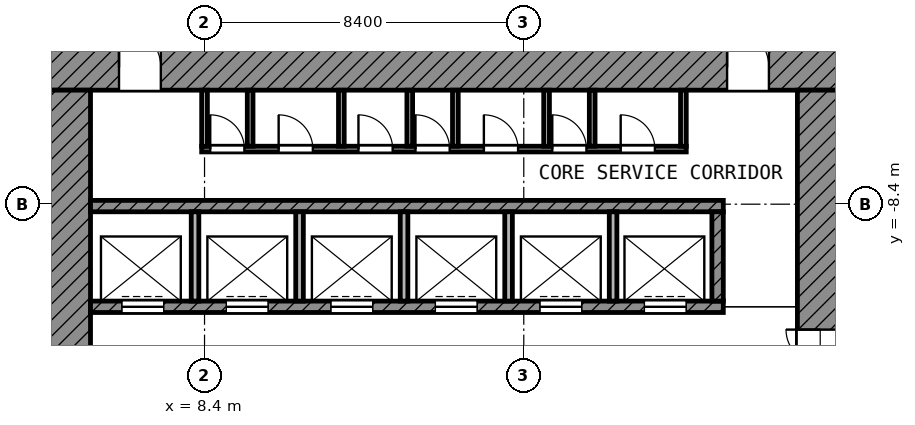
"""IFC4 building model, lengths in metres.
Left out: names, types, materials, properties, quantities, classifications, styles, units other than length and angle.
Written with IfcOpenShell. Run it as: python <this file> out.ifc"""

import sys

from ifc_helpers import new_model, si_unit, direction, frame, frame_2d, origin, place, context, subcontext, project, spatial, rectangle, extrude, element, fill, save


model = new_model("IFC4")
c1 = context("Model", 3, precision=1e-05, world=origin(), true_north=direction((0.0, 1.0)))
c2 = subcontext(c1, "Body", "Model", "MODEL_VIEW")
j1 = project(units=[si_unit("LENGTHUNIT", "METRE"), si_unit("PLANEANGLEUNIT", "RADIAN")], contexts=[c1])
p1 = place(None, origin())
s1 = spatial("IfcSite", under=j1, at=p1, CompositionType="ELEMENT")
p2 = place(p1, origin())
s2 = spatial("IfcBuilding", under=s1, at=p2, CompositionType="ELEMENT")
p3 = place(p2, origin())
s3 = spatial("IfcBuildingStorey", under=s2, at=p3, CompositionType="ELEMENT", Elevation=0.0)
p4 = place(p3, frame((5.381, -0.831, 0.0), z_axis=(0.0, 0.0, 1.0), x_axis=(-0.707106781187, -0.707106781187, 0.0)))
e1 = element("IfcWall", 1, at=p4, inside=s3, PredefinedType="SOLIDWALL", context=c2, shape_type="SweptSolid", body=[
    extrude(rectangle(XDim=6.435, YDim=0.3, at=frame_2d((3.217, 0.0))), origin(), (0.0, 0.0, 1.0), 5.25),
])
p5 = place(p4, frame((0.409, 0.0, 1.0)))
e2 = element("IfcOpeningElement", 2, at=p5, cuts=e1, PredefinedType="OPENING", context=c2, shape_type="SweptSolid", body=[
    extrude(rectangle(XDim=2.4, YDim=1.8, at=frame_2d((1.2, 0.9))), frame((0.0, 0.16, 0.0), z_axis=(0.0, -1.0, 0.0), x_axis=(1.0, 0.0, 0.0)), (0.0, 0.0, 1.0), 0.32),
])
p6 = place(p4, frame((3.626, 0.0, 1.0)))
e3 = element("IfcOpeningElement", 3, at=p6, cuts=e1, PredefinedType="OPENING", context=c2, shape_type="SweptSolid", body=[
    extrude(rectangle(XDim=2.4, YDim=1.8, at=frame_2d((1.2, 0.9))), frame((0.0, 0.16, 0.0), z_axis=(0.0, -1.0, 0.0), x_axis=(1.0, 0.0, 0.0)), (0.0, 0.0, 1.0), 0.32),
])
p7 = place(p3, frame((4.2, -4.8, 0.0), z_axis=(0.0, 0.0, 1.0), x_axis=(1.0, 0.0, 0.0)))
e4 = element("IfcWall", 4, at=p7, inside=s3, PredefinedType="SHEAR", context=c2, shape_type="SweptSolid", body=[
    extrude(rectangle(XDim=21.0, YDim=1.2, at=frame_2d((10.5, 0.0))), origin(), (0.0, 0.0, 1.0), 6.65),
])
p8 = place(p7, frame((1.95, 0.0, 0.0)))
e5 = element("IfcOpeningElement", 5, at=p8, cuts=e4, PredefinedType="OPENING", context=c2, shape_type="SweptSolid", body=[
    extrude(rectangle(XDim=1.1, YDim=2.1, at=frame_2d((0.55, 1.05))), frame((0.0, 0.61, 0.0), z_axis=(0.0, -1.0, 0.0), x_axis=(1.0, 0.0, 0.0)), (0.0, 0.0, 1.0), 1.22),
])
p9 = place(p7, frame((17.95, 0.0, 0.0)))
e6 = element("IfcOpeningElement", 6, at=p9, cuts=e4, PredefinedType="OPENING", context=c2, shape_type="SweptSolid", body=[
    extrude(rectangle(XDim=1.1, YDim=2.1, at=frame_2d((0.55, 1.05))), frame((0.0, 0.61, 0.0), z_axis=(0.0, -1.0, 0.0), x_axis=(1.0, 0.0, 0.0)), (0.0, 0.0, 1.0), 1.22),
])
p10 = place(p3, frame((4.8, -25.2, 0.0), z_axis=(0.0, 0.0, 1.0), x_axis=(0.0, 1.0, 0.0)))
e7 = element("IfcWall", 7, at=p10, inside=s3, PredefinedType="SHEAR", context=c2, shape_type="SweptSolid", body=[
    extrude(rectangle(XDim=19.8, YDim=1.2, at=frame_2d((9.9, 0.0))), origin(), (0.0, 0.0, 1.0), 6.65),
])
p11 = place(p10, frame((11.65, 0.0, 0.0)))
e8 = element("IfcOpeningElement", 8, at=p11, cuts=e7, PredefinedType="OPENING", context=c2, shape_type="SweptSolid", body=[
    extrude(rectangle(XDim=1.1, YDim=2.1, at=frame_2d((0.55, 1.05))), frame((0.0, 0.61, 0.0), z_axis=(0.0, -1.0, 0.0), x_axis=(1.0, 0.0, 0.0)), (0.0, 0.0, 1.0), 1.22),
])
p12 = place(p10, frame((2.35, 0.0, 0.0)))
e9 = element("IfcOpeningElement", 9, at=p12, cuts=e7, PredefinedType="OPENING", context=c2, shape_type="SweptSolid", body=[
    extrude(rectangle(XDim=1.1, YDim=2.1, at=frame_2d((0.55, 1.05))), frame((0.0, 0.61, 0.0), z_axis=(0.0, -1.0, 0.0), x_axis=(1.0, 0.0, 0.0)), (0.0, 0.0, 1.0), 1.22),
])
p13 = place(p3, frame((24.6, -24.0, 0.0), z_axis=(0.0, 0.0, 1.0), x_axis=(0.0, 1.0, 0.0)))
e10 = element("IfcWall", 10, at=p13, inside=s3, PredefinedType="SHEAR", context=c2, shape_type="SweptSolid", body=[
    extrude(rectangle(XDim=18.6, YDim=1.2, at=frame_2d((9.3, 0.0))), origin(), (0.0, 0.0, 1.0), 6.65),
])
p14 = place(p13, frame((10.5, 0.0, 0.0)))
e11 = element("IfcOpeningElement", 11, at=p14, cuts=e10, PredefinedType="OPENING", context=c2, shape_type="SweptSolid", body=[
    extrude(rectangle(XDim=1.8, YDim=2.1, at=frame_2d((0.9, 1.05))), frame((0.0, 0.61, 0.0), z_axis=(0.0, -1.0, 0.0), x_axis=(1.0, 0.0, 0.0)), (0.0, 0.0, 1.0), 1.22),
])
p15 = place(p3, frame((5.4, -8.45, 0.0), z_axis=(0.0, 0.0, 1.0), x_axis=(1.0, 0.0, 0.0)))
e12 = element("IfcWall", 12, at=p15, inside=s3, PredefinedType="SHEAR", context=c2, shape_type="SweptSolid", body=[
    extrude(rectangle(XDim=16.65, YDim=0.3, at=frame_2d((8.325, 0.0))), origin(), (0.0, 0.0, 1.0), 6.65),
])
p16 = place(p3, frame((5.4, -11.1, 0.0), z_axis=(0.0, 0.0, 1.0), x_axis=(1.0, 0.0, 0.0)))
e13 = element("IfcWall", 13, at=p16, inside=s3, PredefinedType="SHEAR", context=c2, shape_type="SweptSolid", body=[
    extrude(rectangle(XDim=16.65, YDim=0.3, at=frame_2d((8.325, 0.0))), origin(), (0.0, 0.0, 1.0), 6.65),
])
p17 = place(p16, frame((0.825, 0.0, 0.0)))
e14 = element("IfcOpeningElement", 14, at=p17, cuts=e13, PredefinedType="OPENING", context=c2, shape_type="SweptSolid", body=[
    extrude(rectangle(XDim=1.1, YDim=2.1, at=frame_2d((0.55, 1.05))), frame((0.0, 0.16, 0.0), z_axis=(0.0, -1.0, 0.0), x_axis=(1.0, 0.0, 0.0)), (0.0, 0.0, 1.0), 0.32),
])
p18 = place(p16, frame((3.575, 0.0, 0.0)))
e15 = element("IfcOpeningElement", 15, at=p18, cuts=e13, PredefinedType="OPENING", context=c2, shape_type="SweptSolid", body=[
    extrude(rectangle(XDim=1.1, YDim=2.1, at=frame_2d((0.55, 1.05))), frame((0.0, 0.16, 0.0), z_axis=(0.0, -1.0, 0.0), x_axis=(1.0, 0.0, 0.0)), (0.0, 0.0, 1.0), 0.32),
])
p19 = place(p16, frame((6.325, 0.0, 0.0)))
e16 = element("IfcOpeningElement", 16, at=p19, cuts=e13, PredefinedType="OPENING", context=c2, shape_type="SweptSolid", body=[
    extrude(rectangle(XDim=1.1, YDim=2.1, at=frame_2d((0.55, 1.05))), frame((0.0, 0.16, 0.0), z_axis=(0.0, -1.0, 0.0), x_axis=(1.0, 0.0, 0.0)), (0.0, 0.0, 1.0), 0.32),
])
p20 = place(p16, frame((9.075, 0.0, 0.0)))
e17 = element("IfcOpeningElement", 17, at=p20, cuts=e13, PredefinedType="OPENING", context=c2, shape_type="SweptSolid", body=[
    extrude(rectangle(XDim=1.1, YDim=2.1, at=frame_2d((0.55, 1.05))), frame((0.0, 0.16, 0.0), z_axis=(0.0, -1.0, 0.0), x_axis=(1.0, 0.0, 0.0)), (0.0, 0.0, 1.0), 0.32),
])
p21 = place(p16, frame((11.825, 0.0, 0.0)))
e18 = element("IfcOpeningElement", 18, at=p21, cuts=e13, PredefinedType="OPENING", context=c2, shape_type="SweptSolid", body=[
    extrude(rectangle(XDim=1.1, YDim=2.1, at=frame_2d((0.55, 1.05))), frame((0.0, 0.16, 0.0), z_axis=(0.0, -1.0, 0.0), x_axis=(1.0, 0.0, 0.0)), (0.0, 0.0, 1.0), 0.32),
])
p22 = place(p16, frame((14.575, 0.0, 0.0)))
e19 = element("IfcOpeningElement", 19, at=p22, cuts=e13, PredefinedType="OPENING", context=c2, shape_type="SweptSolid", body=[
    extrude(rectangle(XDim=1.1, YDim=2.1, at=frame_2d((0.55, 1.05))), frame((0.0, 0.16, 0.0), z_axis=(0.0, -1.0, 0.0), x_axis=(1.0, 0.0, 0.0)), (0.0, 0.0, 1.0), 0.32),
])
p23 = place(p3, frame((21.9, -10.95, 0.0), z_axis=(0.0, 0.0, 1.0), x_axis=(0.0, 1.0, 0.0)))
e20 = element("IfcWall", 20, at=p23, inside=s3, PredefinedType="SHEAR", context=c2, shape_type="SweptSolid", body=[
    extrude(rectangle(XDim=2.35, YDim=0.3, at=frame_2d((1.175, 0.0))), origin(), (0.0, 0.0, 1.0), 6.65),
])
for number, where, z_axis, x_axis in (
    (21, (8.15, -10.95, 0.0), (0.0, 0.0, 1.0), (0.0, 1.0, 0.0)),
    (22, (10.9, -10.95, 0.0), (0.0, 0.0, 1.0), (0.0, 1.0, 0.0)),
    (23, (13.65, -10.95, 0.0), (0.0, 0.0, 1.0), (0.0, 1.0, 0.0)),
    (24, (16.4, -10.95, 0.0), (0.0, 0.0, 1.0), (0.0, 1.0, 0.0)),
    (25, (19.15, -10.95, 0.0), (0.0, 0.0, 1.0), (0.0, 1.0, 0.0)),
):
    element("IfcWall", number, at=place(p3, frame(where, z_axis=z_axis, x_axis=x_axis)), inside=s3, PredefinedType="PARTITIONING", context=c2, shape_type="SweptSolid", body=[
        extrude(rectangle(XDim=2.35, YDim=0.2, at=frame_2d((1.175, 0.0))), origin(), (0.0, 0.0, 1.0), 6.65),
    ])
p24 = place(p3, frame((8.325, -6.95, 0.0), z_axis=(0.0, 0.0, 1.0), x_axis=(1.0, 0.0, 0.0)))
e26 = element("IfcWall", 26, at=p24, inside=s3, PredefinedType="PARTITIONING", context=c2, shape_type="SweptSolid", body=[
    extrude(rectangle(XDim=12.75, YDim=0.15, at=frame_2d((6.375, 0.0))), origin(), (0.0, 0.0, 1.0), 6.65),
])
p25 = place(p24, frame((0.225, 0.0, 0.0)))
e27 = element("IfcOpeningElement", 27, at=p25, cuts=e26, PredefinedType="OPENING", context=c2, shape_type="SweptSolid", body=[
    extrude(rectangle(XDim=0.9, YDim=2.1, at=frame_2d((0.45, 1.05))), frame((0.0, 0.085, 0.0), z_axis=(0.0, -1.0, 0.0), x_axis=(1.0, 0.0, 0.0)), (0.0, 0.0, 1.0), 0.17),
])
p26 = place(p24, frame((2.025, 0.0, 0.0)))
e28 = element("IfcOpeningElement", 28, at=p26, cuts=e26, PredefinedType="OPENING", context=c2, shape_type="SweptSolid", body=[
    extrude(rectangle(XDim=0.9, YDim=2.1, at=frame_2d((0.45, 1.05))), frame((0.0, 0.085, 0.0), z_axis=(0.0, -1.0, 0.0), x_axis=(1.0, 0.0, 0.0)), (0.0, 0.0, 1.0), 0.17),
])
p27 = place(p24, frame((4.125, 0.0, 0.0)))
e29 = element("IfcOpeningElement", 29, at=p27, cuts=e26, PredefinedType="OPENING", context=c2, shape_type="SweptSolid", body=[
    extrude(rectangle(XDim=0.9, YDim=2.1, at=frame_2d((0.45, 1.05))), frame((0.0, 0.085, 0.0), z_axis=(0.0, -1.0, 0.0), x_axis=(1.0, 0.0, 0.0)), (0.0, 0.0, 1.0), 0.17),
])
p28 = place(p24, frame((5.625, 0.0, 0.0)))
e30 = element("IfcOpeningElement", 30, at=p28, cuts=e26, PredefinedType="OPENING", context=c2, shape_type="SweptSolid", body=[
    extrude(rectangle(XDim=0.9, YDim=2.1, at=frame_2d((0.45, 1.05))), frame((0.0, 0.085, 0.0), z_axis=(0.0, -1.0, 0.0), x_axis=(1.0, 0.0, 0.0)), (0.0, 0.0, 1.0), 0.17),
])
p29 = place(p24, frame((7.425, 0.0, 0.0)))
e31 = element("IfcOpeningElement", 31, at=p29, cuts=e26, PredefinedType="OPENING", context=c2, shape_type="SweptSolid", body=[
    extrude(rectangle(XDim=0.9, YDim=2.1, at=frame_2d((0.45, 1.05))), frame((0.0, 0.085, 0.0), z_axis=(0.0, -1.0, 0.0), x_axis=(1.0, 0.0, 0.0)), (0.0, 0.0, 1.0), 0.17),
])
p30 = place(p24, frame((9.225, 0.0, 0.0)))
e32 = element("IfcOpeningElement", 32, at=p30, cuts=e26, PredefinedType="OPENING", context=c2, shape_type="SweptSolid", body=[
    extrude(rectangle(XDim=0.9, YDim=2.1, at=frame_2d((0.45, 1.05))), frame((0.0, 0.085, 0.0), z_axis=(0.0, -1.0, 0.0), x_axis=(1.0, 0.0, 0.0)), (0.0, 0.0, 1.0), 0.17),
])
p31 = place(p24, frame((11.025, 0.0, 0.0)))
e33 = element("IfcOpeningElement", 33, at=p31, cuts=e26, PredefinedType="OPENING", context=c2, shape_type="SweptSolid", body=[
    extrude(rectangle(XDim=0.9, YDim=2.1, at=frame_2d((0.45, 1.05))), frame((0.0, 0.085, 0.0), z_axis=(0.0, -1.0, 0.0), x_axis=(1.0, 0.0, 0.0)), (0.0, 0.0, 1.0), 0.17),
])
for number, where, z_axis, x_axis in (
    (34, (8.4, -6.875, 0.0), (0.0, 0.0, 1.0), (0.0, 1.0, 0.0)),
    (35, (9.6, -6.875, 0.0), (0.0, 0.0, 1.0), (0.0, 1.0, 0.0)),
    (36, (12.0, -6.875, 0.0), (0.0, 0.0, 1.0), (0.0, 1.0, 0.0)),
    (37, (13.8, -6.875, 0.0), (0.0, 0.0, 1.0), (0.0, 1.0, 0.0)),
    (38, (15.0, -6.875, 0.0), (0.0, 0.0, 1.0), (0.0, 1.0, 0.0)),
    (39, (17.4, -6.875, 0.0), (0.0, 0.0, 1.0), (0.0, 1.0, 0.0)),
    (40, (18.6, -6.875, 0.0), (0.0, 0.0, 1.0), (0.0, 1.0, 0.0)),
    (41, (21.0, -6.875, 0.0), (0.0, 0.0, 1.0), (0.0, 1.0, 0.0)),
):
    element("IfcWall", number, at=place(p3, frame(where, z_axis=z_axis, x_axis=x_axis)), inside=s3, PredefinedType="PARTITIONING", context=c2, shape_type="SweptSolid", body=[
        extrude(rectangle(XDim=1.475, YDim=0.15, at=frame_2d((0.738, 0.0))), origin(), (0.0, 0.0, 1.0), 6.65),
    ])
p32 = place(p17, origin())
e42 = element("IfcDoor", 42, at=p32, inside=s3, OperationType="DOUBLE_DOOR_SLIDING", PredefinedType="DOOR", context=c2, shape_type="SweptSolid", body=[
    extrude(rectangle(XDim=1.1, YDim=2.1, at=frame_2d((0.55, 1.05))), frame((0.0, 0.025, 0.0), z_axis=(0.0, -1.0, 0.0), x_axis=(1.0, 0.0, 0.0)), (0.0, 0.0, 1.0), 0.05),
])
fill(e14, e42)
p33 = place(p18, origin())
e43 = element("IfcDoor", 43, at=p33, inside=s3, OperationType="DOUBLE_DOOR_SLIDING", PredefinedType="DOOR", context=c2, shape_type="SweptSolid", body=[
    extrude(rectangle(XDim=1.1, YDim=2.1, at=frame_2d((0.55, 1.05))), frame((0.0, 0.025, 0.0), z_axis=(0.0, -1.0, 0.0), x_axis=(1.0, 0.0, 0.0)), (0.0, 0.0, 1.0), 0.05),
])
fill(e15, e43)
p34 = place(p19, origin())
e44 = element("IfcDoor", 44, at=p34, inside=s3, OperationType="DOUBLE_DOOR_SLIDING", PredefinedType="DOOR", context=c2, shape_type="SweptSolid", body=[
    extrude(rectangle(XDim=1.1, YDim=2.1, at=frame_2d((0.55, 1.05))), frame((0.0, 0.025, 0.0), z_axis=(0.0, -1.0, 0.0), x_axis=(1.0, 0.0, 0.0)), (0.0, 0.0, 1.0), 0.05),
])
fill(e16, e44)
p35 = place(p20, origin())
e45 = element("IfcDoor", 45, at=p35, inside=s3, OperationType="DOUBLE_DOOR_SLIDING", PredefinedType="DOOR", context=c2, shape_type="SweptSolid", body=[
    extrude(rectangle(XDim=1.1, YDim=2.1, at=frame_2d((0.55, 1.05))), frame((0.0, 0.025, 0.0), z_axis=(0.0, -1.0, 0.0), x_axis=(1.0, 0.0, 0.0)), (0.0, 0.0, 1.0), 0.05),
])
fill(e17, e45)
p36 = place(p21, origin())
e46 = element("IfcDoor", 46, at=p36, inside=s3, OperationType="DOUBLE_DOOR_SLIDING", PredefinedType="DOOR", context=c2, shape_type="SweptSolid", body=[
    extrude(rectangle(XDim=1.1, YDim=2.1, at=frame_2d((0.55, 1.05))), frame((0.0, 0.025, 0.0), z_axis=(0.0, -1.0, 0.0), x_axis=(1.0, 0.0, 0.0)), (0.0, 0.0, 1.0), 0.05),
])
fill(e18, e46)
p37 = place(p22, origin())
e47 = element("IfcDoor", 47, at=p37, inside=s3, OperationType="DOUBLE_DOOR_SLIDING", PredefinedType="DOOR", context=c2, shape_type="SweptSolid", body=[
    extrude(rectangle(XDim=1.1, YDim=2.1, at=frame_2d((0.55, 1.05))), frame((0.0, 0.025, 0.0), z_axis=(0.0, -1.0, 0.0), x_axis=(1.0, 0.0, 0.0)), (0.0, 0.0, 1.0), 0.05),
])
fill(e19, e47)
p38 = place(p8, origin())
e48 = element("IfcDoor", 48, at=p38, inside=s3, OperationType="SINGLE_SWING_LEFT", PredefinedType="DOOR", context=c2, shape_type="SweptSolid", body=[
    extrude(rectangle(XDim=1.1, YDim=2.1, at=frame_2d((0.55, 1.05))), frame((0.0, 0.025, 0.0), z_axis=(0.0, -1.0, 0.0), x_axis=(1.0, 0.0, 0.0)), (0.0, 0.0, 1.0), 0.05),
])
fill(e5, e48)
p39 = place(p9, origin())
e49 = element("IfcDoor", 49, at=p39, inside=s3, OperationType="SINGLE_SWING_LEFT", PredefinedType="DOOR", context=c2, shape_type="SweptSolid", body=[
    extrude(rectangle(XDim=1.1, YDim=2.1, at=frame_2d((0.55, 1.05))), frame((0.0, 0.025, 0.0), z_axis=(0.0, -1.0, 0.0), x_axis=(1.0, 0.0, 0.0)), (0.0, 0.0, 1.0), 0.05),
])
fill(e6, e49)
p40 = place(p14, origin())
e50 = element("IfcDoor", 50, at=p40, inside=s3, OperationType="DOUBLE_DOOR_SINGLE_SWING", PredefinedType="DOOR", context=c2, shape_type="SweptSolid", body=[
    extrude(rectangle(XDim=1.8, YDim=2.1, at=frame_2d((0.9, 1.05))), frame((0.0, 0.025, 0.0), z_axis=(0.0, -1.0, 0.0), x_axis=(1.0, 0.0, 0.0)), (0.0, 0.0, 1.0), 0.05),
])
fill(e11, e50)
p41 = place(p25, origin())
e51 = element("IfcDoor", 51, at=p41, inside=s3, OperationType="SINGLE_SWING_LEFT", PredefinedType="DOOR", context=c2, shape_type="SweptSolid", body=[
    extrude(rectangle(XDim=0.9, YDim=2.1, at=frame_2d((0.45, 1.05))), frame((0.0, 0.025, 0.0), z_axis=(0.0, -1.0, 0.0), x_axis=(1.0, 0.0, 0.0)), (0.0, 0.0, 1.0), 0.05),
])
fill(e27, e51)
p42 = place(p26, origin())
e52 = element("IfcDoor", 52, at=p42, inside=s3, OperationType="SINGLE_SWING_LEFT", PredefinedType="DOOR", context=c2, shape_type="SweptSolid", body=[
    extrude(rectangle(XDim=0.9, YDim=2.1, at=frame_2d((0.45, 1.05))), frame((0.0, 0.025, 0.0), z_axis=(0.0, -1.0, 0.0), x_axis=(1.0, 0.0, 0.0)), (0.0, 0.0, 1.0), 0.05),
])
fill(e28, e52)
p43 = place(p27, origin())
e53 = element("IfcDoor", 53, at=p43, inside=s3, OperationType="SINGLE_SWING_LEFT", PredefinedType="DOOR", context=c2, shape_type="SweptSolid", body=[
    extrude(rectangle(XDim=0.9, YDim=2.1, at=frame_2d((0.45, 1.05))), frame((0.0, 0.025, 0.0), z_axis=(0.0, -1.0, 0.0), x_axis=(1.0, 0.0, 0.0)), (0.0, 0.0, 1.0), 0.05),
])
fill(e29, e53)
p44 = place(p28, origin())
e54 = element("IfcDoor", 54, at=p44, inside=s3, OperationType="SINGLE_SWING_LEFT", PredefinedType="DOOR", context=c2, shape_type="SweptSolid", body=[
    extrude(rectangle(XDim=0.9, YDim=2.1, at=frame_2d((0.45, 1.05))), frame((0.0, 0.025, 0.0), z_axis=(0.0, -1.0, 0.0), x_axis=(1.0, 0.0, 0.0)), (0.0, 0.0, 1.0), 0.05),
])
fill(e30, e54)
p45 = place(p29, origin())
e55 = element("IfcDoor", 55, at=p45, inside=s3, OperationType="SINGLE_SWING_LEFT", PredefinedType="DOOR", context=c2, shape_type="SweptSolid", body=[
    extrude(rectangle(XDim=0.9, YDim=2.1, at=frame_2d((0.45, 1.05))), frame((0.0, 0.025, 0.0), z_axis=(0.0, -1.0, 0.0), x_axis=(1.0, 0.0, 0.0)), (0.0, 0.0, 1.0), 0.05),
])
fill(e31, e55)
p46 = place(p30, origin())
e56 = element("IfcDoor", 56, at=p46, inside=s3, OperationType="SINGLE_SWING_LEFT", PredefinedType="DOOR", context=c2, shape_type="SweptSolid", body=[
    extrude(rectangle(XDim=0.9, YDim=2.1, at=frame_2d((0.45, 1.05))), frame((0.0, 0.025, 0.0), z_axis=(0.0, -1.0, 0.0), x_axis=(1.0, 0.0, 0.0)), (0.0, 0.0, 1.0), 0.05),
])
fill(e32, e56)
p47 = place(p31, origin())
e57 = element("IfcDoor", 57, at=p47, inside=s3, OperationType="SINGLE_SWING_LEFT", PredefinedType="DOOR", context=c2, shape_type="SweptSolid", body=[
    extrude(rectangle(XDim=0.9, YDim=2.1, at=frame_2d((0.45, 1.05))), frame((0.0, 0.025, 0.0), z_axis=(0.0, -1.0, 0.0), x_axis=(1.0, 0.0, 0.0)), (0.0, 0.0, 1.0), 0.05),
])
fill(e33, e57)
save(model, sys.argv[1])
